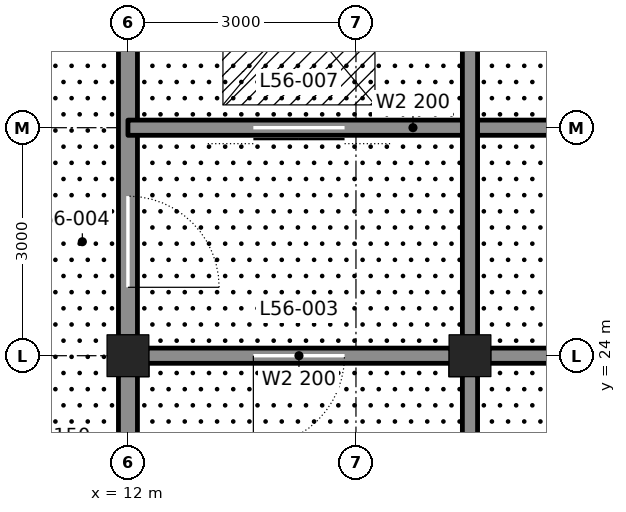
"""IFC4 building model, lengths in metres.
Left out: names, types, materials, properties, quantities, classifications, styles, units other than length and angle.
Written with IfcOpenShell. Run it as: python <this file> out.ifc"""

import sys

from ifc_helpers import new_model, si_unit, direction, frame, frame_2d, origin, origin_2d, place, context, subcontext, project, spatial, rectangle, hollow_rectangle, extrude, element, fill, save


model = new_model("IFC4")
c1 = context("Model", 3, precision=1e-05, world=origin(), true_north=direction((0.0, 1.0)))
c2 = subcontext(c1, "Body", "Model", "MODEL_VIEW")
j1 = project(units=[si_unit("LENGTHUNIT", "METRE"), si_unit("PLANEANGLEUNIT", "RADIAN")], contexts=[c1])
p1 = place(None, origin())
s1 = spatial("IfcSite", under=j1, at=p1, CompositionType="ELEMENT")
p2 = place(p1, origin())
s2 = spatial("IfcBuilding", under=s1, at=p2, CompositionType="ELEMENT")
p3 = place(p2, frame((0.0, 0.0, 251.7)))
s3 = spatial("IfcBuildingStorey", under=s2, at=p3, CompositionType="ELEMENT", Elevation=251.7)
for number, where, z_axis, x_axis in (
    (1, (12.0, 24.0, 0.0), (0.0, 0.0, 1.0), (1.0, 0.0, 0.0)),
    (2, (16.5, 24.0, 0.0), (0.0, 0.0, 1.0), (1.0, 0.0, 0.0)),
):
    element("IfcColumn", number, at=place(p3, frame(where, z_axis=z_axis, x_axis=x_axis)), inside=s3, PredefinedType="COLUMN", context=c2, shape_type="SweptSolid", body=[
        extrude(hollow_rectangle(XDim=0.55, YDim=0.55, WallThickness=0.045, at=origin_2d()), origin(), (0.0, 0.0, 1.0), 6.0),
    ])
p4 = place(p3, frame((12.0, 21.25, 0.0), z_axis=(0.0, 0.0, 1.0), x_axis=(0.0, 1.0, 0.0)))
e3 = element("IfcWall", 3, at=p4, inside=s3, PredefinedType="SOLIDWALL", context=c2, shape_type="SweptSolid", body=[
    extrude(rectangle(XDim=2.5, YDim=0.25, at=frame_2d((1.25, 0.0))), origin(), (0.0, 0.0, 1.0), 4.913),
])
p5 = place(p3, frame((12.0, 24.25, 0.0), z_axis=(0.0, 0.0, 1.0), x_axis=(0.0, 1.0, 0.0)))
e4 = element("IfcWall", 4, at=p5, inside=s3, PredefinedType="SOLIDWALL", context=c2, shape_type="SweptSolid", body=[
    extrude(rectangle(XDim=8.5, YDim=0.25, at=frame_2d((4.25, 0.0))), origin(), (0.0, 0.0, 1.0), 4.913),
])
p6 = place(p5, frame((0.65, 0.0, 0.0)))
e5 = element("IfcOpeningElement", 5, at=p6, cuts=e4, PredefinedType="OPENING", context=c2, shape_type="SweptSolid", body=[
    extrude(rectangle(XDim=1.2, YDim=2.1, at=frame_2d((0.6, 1.05))), frame((0.0, 0.135, 0.0), z_axis=(0.0, -1.0, 0.0), x_axis=(1.0, 0.0, 0.0)), (0.0, 0.0, 1.0), 0.27),
])
p7 = place(p5, frame((6.875, 0.0, 0.0)))
e6 = element("IfcOpeningElement", 6, at=p7, cuts=e4, PredefinedType="OPENING", context=c2, shape_type="SweptSolid", body=[
    extrude(rectangle(XDim=0.75, YDim=2.1, at=frame_2d((0.375, 1.05))), frame((0.0, 0.135, 0.0), z_axis=(0.0, -1.0, 0.0), x_axis=(1.0, 0.0, 0.0)), (0.0, 0.0, 1.0), 0.27),
])
p8 = place(p3, frame((12.25, 24.0, 0.0), z_axis=(0.0, 0.0, 1.0), x_axis=(1.0, 0.0, 0.0)))
e7 = element("IfcWall", 7, at=p8, inside=s3, PredefinedType="SOLIDWALL", context=c2, shape_type="SweptSolid", body=[
    extrude(rectangle(XDim=4.0, YDim=0.2, at=frame_2d((2.0, 0.0))), origin(), (0.0, 0.0, 1.0), 4.89),
])
p9 = place(p8, frame((1.4, 0.0, 0.0)))
e8 = element("IfcOpeningElement", 8, at=p9, cuts=e7, PredefinedType="OPENING", context=c2, shape_type="SweptSolid", body=[
    extrude(rectangle(XDim=1.2, YDim=2.1, at=frame_2d((0.6, 1.05))), frame((0.0, 0.11, 0.0), z_axis=(0.0, -1.0, 0.0), x_axis=(1.0, 0.0, 0.0)), (0.0, 0.0, 1.0), 0.22),
])
p10 = place(p3, frame((16.75, 24.0, 0.0), z_axis=(0.0, 0.0, 1.0), x_axis=(1.0, 0.0, 0.0)))
e9 = element("IfcWall", 9, at=p10, inside=s3, PredefinedType="SOLIDWALL", context=c2, shape_type="SweptSolid", body=[
    extrude(rectangle(XDim=2.75, YDim=0.2, at=frame_2d((1.375, 0.0))), origin(), (0.0, 0.0, 1.0), 4.89),
])
p11 = place(p3, frame((12.0, 27.0, 0.0), z_axis=(0.0, 0.0, 1.0), x_axis=(1.0, 0.0, 0.0)))
e10 = element("IfcWall", 10, at=p11, inside=s3, PredefinedType="SOLIDWALL", context=c2, shape_type="SweptSolid", body=[
    extrude(rectangle(XDim=7.5, YDim=0.2, at=frame_2d((3.75, 0.0))), origin(), (0.0, 0.0, 1.0), 5.84),
])
p12 = place(p11, frame((1.65, 0.0, 0.0)))
e11 = element("IfcOpeningElement", 11, at=p12, cuts=e10, PredefinedType="OPENING", context=c2, shape_type="SweptSolid", body=[
    extrude(rectangle(XDim=1.2, YDim=2.1, at=frame_2d((0.6, 1.05))), frame((0.0, 0.11, 0.0), z_axis=(0.0, -1.0, 0.0), x_axis=(1.0, 0.0, 0.0)), (0.0, 0.0, 1.0), 0.22),
])
p13 = place(p3, frame((16.5, 21.25, 0.0), z_axis=(0.0, 0.0, 1.0), x_axis=(0.0, 1.0, 0.0)))
e12 = element("IfcWall", 12, at=p13, inside=s3, PredefinedType="SOLIDWALL", context=c2, shape_type="SweptSolid", body=[
    extrude(rectangle(XDim=2.5, YDim=0.2, at=frame_2d((1.25, 0.0))), origin(), (0.0, 0.0, 1.0), 4.913),
])
p14 = place(p3, frame((16.5, 24.25, 0.0), z_axis=(0.0, 0.0, 1.0), x_axis=(0.0, 1.0, 0.0)))
e13 = element("IfcWall", 13, at=p14, inside=s3, PredefinedType="SOLIDWALL", context=c2, shape_type="SweptSolid", body=[
    extrude(rectangle(XDim=8.5, YDim=0.2, at=frame_2d((4.25, 0.0))), origin(), (0.0, 0.0, 1.0), 4.913),
])
p15 = place(p9, frame((1.2, 0.0, 0.0), z_axis=(0.0, 0.0, 1.0), x_axis=(-1.0, 0.0, 0.0)))
e14 = element("IfcDoor", 14, at=p15, inside=s3, OperationType="SINGLE_SWING_RIGHT", PredefinedType="DOOR", context=c2, shape_type="SweptSolid", body=[
    extrude(rectangle(XDim=1.2, YDim=2.1, at=frame_2d((0.6, 1.05))), frame((0.0, 0.025, 0.0), z_axis=(0.0, -1.0, 0.0), x_axis=(1.0, 0.0, 0.0)), (0.0, 0.0, 1.0), 0.05),
])
fill(e8, e14)
p16 = place(p6, frame((1.2, 0.0, 0.0), z_axis=(0.0, 0.0, 1.0), x_axis=(-1.0, 0.0, 0.0)))
e15 = element("IfcDoor", 15, at=p16, inside=s3, OperationType="SINGLE_SWING_RIGHT", PredefinedType="DOOR", context=c2, shape_type="SweptSolid", body=[
    extrude(rectangle(XDim=1.2, YDim=2.1, at=frame_2d((0.6, 1.05))), frame((0.0, 0.025, 0.0), z_axis=(0.0, -1.0, 0.0), x_axis=(1.0, 0.0, 0.0)), (0.0, 0.0, 1.0), 0.05),
])
fill(e5, e15)
p17 = place(p12, origin())
e16 = element("IfcDoor", 16, at=p17, inside=s3, OperationType="DOUBLE_DOOR_SLIDING", PredefinedType="DOOR", context=c2, shape_type="SweptSolid", body=[
    extrude(rectangle(XDim=1.2, YDim=2.1, at=frame_2d((0.6, 1.05))), frame((0.0, 0.025, 0.0), z_axis=(0.0, -1.0, 0.0), x_axis=(1.0, 0.0, 0.0)), (0.0, 0.0, 1.0), 0.05),
])
fill(e11, e16)
save(model, sys.argv[1])
